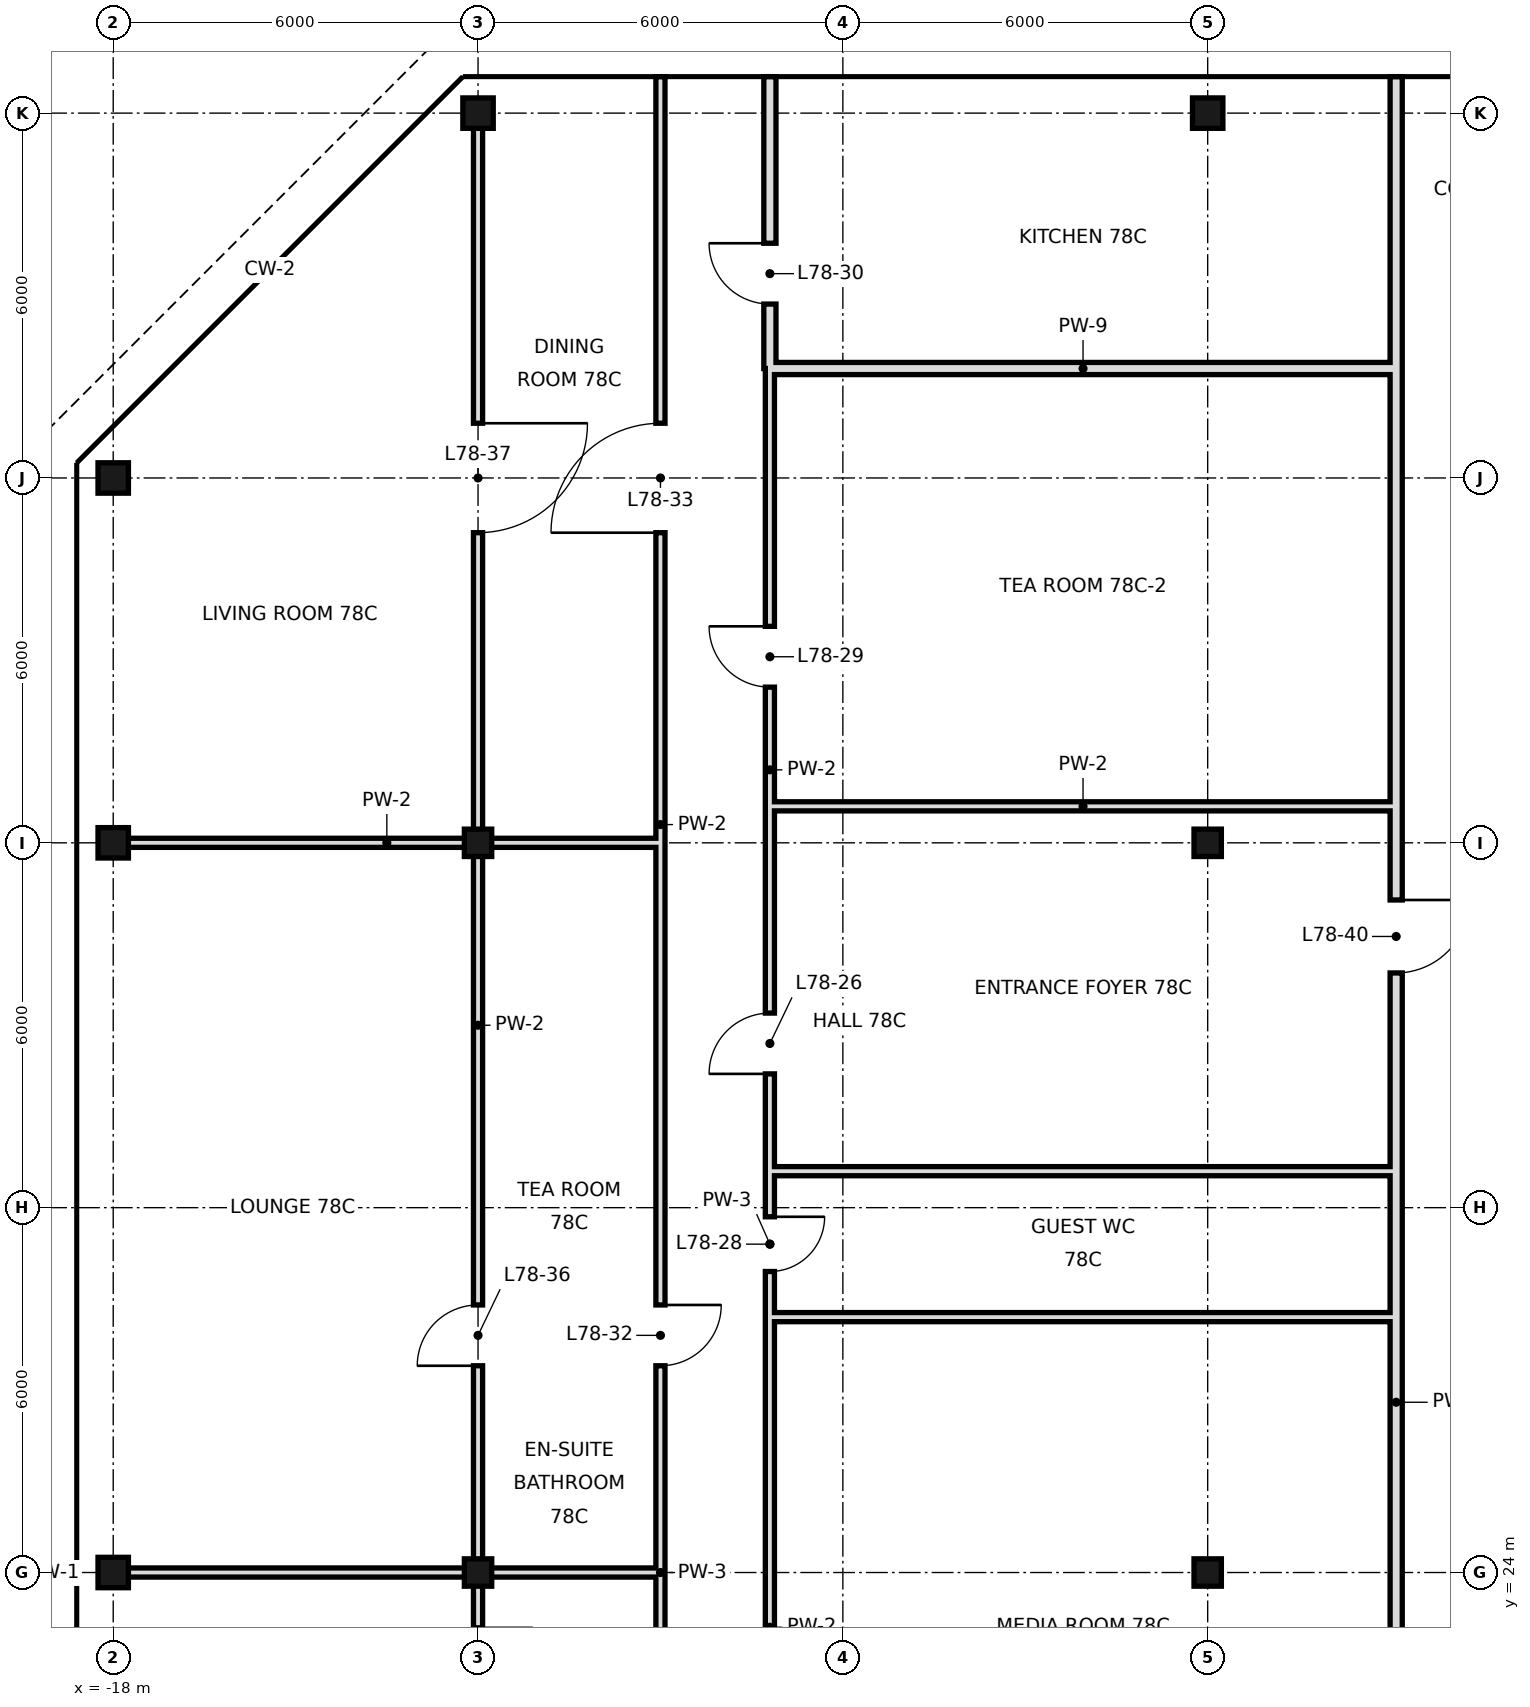
"""IFC4 building model, lengths in metres.
Left out: names, types, materials, properties, quantities, classifications, styles, units other than length and angle.
Written with IfcOpenShell. Run it as: python <this file> out.ifc"""

import sys

from ifc_helpers import new_model, si_unit, direction, frame, frame_2d, origin, origin_2d, place, context, subcontext, project, spatial, rectangle, hollow_rectangle, extrude, element, fill, save


model = new_model("IFC4")
c1 = context("Model", 3, precision=1e-05, world=origin(), true_north=direction((0.0, 1.0)))
c2 = subcontext(c1, "Body", "Model", "MODEL_VIEW")
j1 = project(units=[si_unit("LENGTHUNIT", "METRE"), si_unit("PLANEANGLEUNIT", "RADIAN")], contexts=[c1])
p1 = place(None, origin())
s1 = spatial("IfcSite", under=j1, at=p1, CompositionType="ELEMENT")
p2 = place(p1, origin())
s2 = spatial("IfcBuilding", under=s1, at=p2, CompositionType="ELEMENT")
p3 = place(p2, frame((0.0, 0.0, 326.8)))
s3 = spatial("IfcBuildingStorey", under=s2, at=p3, CompositionType="ELEMENT", Elevation=326.8)
for number, where, z_axis, x_axis in (
    (1, (-18.0, 24.0, 0.0), (0.0, 0.0, 1.0), (1.0, 0.0, 0.0)),
    (2, (-18.0, 36.0, 0.0), (0.0, 0.0, 1.0), (1.0, 0.0, 0.0)),
):
    element("IfcColumn", number, at=place(p3, frame(where, z_axis=z_axis, x_axis=x_axis)), inside=s3, PredefinedType="COLUMN", context=c2, shape_type="SweptSolid", body=[
        extrude(hollow_rectangle(XDim=0.5, YDim=0.5, WallThickness=0.025, at=origin_2d()), origin(), (0.0, 0.0, 1.0), 4.4),
    ])
p4 = place(p3, frame((-18.0, 42.0, 0.0), z_axis=(0.0, 0.0, 1.0), x_axis=(1.0, 0.0, 0.0)))
e3 = element("IfcColumn", 3, at=p4, inside=s3, PredefinedType="COLUMN", context=c2, shape_type="SweptSolid", body=[
    extrude(hollow_rectangle(XDim=0.5, YDim=0.5, WallThickness=0.025, at=origin_2d()), origin(), (0.0, 0.0, 1.0), 4.1),
])
for number, where, z_axis, x_axis in (
    (4, (-12.0, 24.0, 0.0), (0.0, 0.0, 1.0), (1.0, 0.0, 0.0)),
    (5, (-12.0, 36.0, 0.0), (0.0, 0.0, 1.0), (1.0, 0.0, 0.0)),
):
    element("IfcColumn", number, at=place(p3, frame(where, z_axis=z_axis, x_axis=x_axis)), inside=s3, PredefinedType="COLUMN", context=c2, shape_type="SweptSolid", body=[
        extrude(hollow_rectangle(XDim=0.45, YDim=0.45, WallThickness=0.022, at=origin_2d()), origin(), (0.0, 0.0, 1.0), 4.4),
    ])
p5 = place(p3, frame((-12.0, 48.0, 0.0), z_axis=(0.0, 0.0, 1.0), x_axis=(1.0, 0.0, 0.0)))
e6 = element("IfcColumn", 6, at=p5, inside=s3, PredefinedType="COLUMN", context=c2, shape_type="SweptSolid", body=[
    extrude(hollow_rectangle(XDim=0.5, YDim=0.5, WallThickness=0.025, at=origin_2d()), origin(), (0.0, 0.0, 1.0), 4.4),
])
for number, where, z_axis, x_axis in (
    (7, (0.0, 24.0, 0.0), (0.0, 0.0, 1.0), (1.0, 0.0, 0.0)),
    (8, (0.0, 36.0, 0.0), (0.0, 0.0, 1.0), (1.0, 0.0, 0.0)),
):
    element("IfcColumn", number, at=place(p3, frame(where, z_axis=z_axis, x_axis=x_axis)), inside=s3, PredefinedType="COLUMN", context=c2, shape_type="SweptSolid", body=[
        extrude(hollow_rectangle(XDim=0.45, YDim=0.45, WallThickness=0.022, at=origin_2d()), origin(), (0.0, 0.0, 1.0), 4.4),
    ])
p6 = place(p3, frame((0.0, 48.0, 0.0), z_axis=(0.0, 0.0, 1.0), x_axis=(1.0, 0.0, 0.0)))
e9 = element("IfcColumn", 9, at=p6, inside=s3, PredefinedType="COLUMN", context=c2, shape_type="SweptSolid", body=[
    extrude(hollow_rectangle(XDim=0.5, YDim=0.5, WallThickness=0.025, at=origin_2d()), origin(), (0.0, 0.0, 1.0), 4.4),
])
p7 = place(p3, frame((-12.0, 24.0, 0.0), z_axis=(0.0, 0.0, 1.0), x_axis=(0.0, 1.0, 0.0)))
e10 = element("IfcWall", 10, at=p7, inside=s3, PredefinedType="PARTITIONING", context=c2, shape_type="SweptSolid", body=[
    extrude(rectangle(XDim=24.0, YDim=0.15, at=frame_2d((12.0, 0.0))), origin(), (0.0, 0.0, 1.0), 3.4),
])
p8 = place(p7, frame((3.4, 0.0, 0.0)))
e11 = element("IfcOpeningElement", 11, at=p8, cuts=e10, PredefinedType="OPENING", context=c2, shape_type="SweptSolid", body=[
    extrude(rectangle(XDim=1.0, YDim=2.4, at=frame_2d((0.5, 1.2))), frame((0.0, 0.085, 0.0), z_axis=(0.0, -1.0, 0.0), x_axis=(1.0, 0.0, 0.0)), (0.0, 0.0, 1.0), 0.17),
])
p9 = place(p7, frame((17.1, 0.0, 0.0)))
e12 = element("IfcOpeningElement", 12, at=p9, cuts=e10, PredefinedType="OPENING", context=c2, shape_type="SweptSolid", body=[
    extrude(rectangle(XDim=1.8, YDim=2.4, at=frame_2d((0.9, 1.2))), frame((0.0, 0.085, 0.0), z_axis=(0.0, -1.0, 0.0), x_axis=(1.0, 0.0, 0.0)), (0.0, 0.0, 1.0), 0.17),
])
p10 = place(p3, frame((-12.0, 20.4, 0.0), z_axis=(0.0, 0.0, 1.0), x_axis=(0.0, 1.0, 0.0)))
e13 = element("IfcWall", 13, at=p10, inside=s3, PredefinedType="PARTITIONING", context=c2, shape_type="SweptSolid", body=[
    extrude(rectangle(XDim=3.6, YDim=0.15, at=frame_2d((1.8, 0.0))), origin(), (0.0, 0.0, 1.0), 3.4),
])
p11 = place(p10, frame((1.79, 0.0, 0.0)))
e14 = element("IfcOpeningElement", 14, at=p11, cuts=e13, PredefinedType="OPENING", context=c2, shape_type="SweptSolid", body=[
    extrude(rectangle(XDim=0.9, YDim=2.4, at=frame_2d((0.45, 1.2))), frame((0.0, 0.085, 0.0), z_axis=(0.0, -1.0, 0.0), x_axis=(1.0, 0.0, 0.0)), (0.0, 0.0, 1.0), 0.17),
])
p12 = place(p3, frame((-7.2, 43.8, 0.0), z_axis=(0.0, 0.0, 1.0), x_axis=(0.0, 1.0, 0.0)))
e15 = element("IfcWall", 15, at=p12, inside=s3, PredefinedType="SOLIDWALL", context=c2, shape_type="SweptSolid", body=[
    extrude(rectangle(XDim=4.8, YDim=0.2, at=frame_2d((2.4, 0.0))), origin(), (0.0, 0.0, 1.0), 3.4),
])
p13 = place(p12, frame((1.06, 0.0, 0.0)))
e16 = element("IfcOpeningElement", 16, at=p13, cuts=e15, PredefinedType="OPENING", context=c2, shape_type="SweptSolid", body=[
    extrude(rectangle(XDim=1.0, YDim=2.4, at=frame_2d((0.5, 1.2))), frame((0.0, 0.11, 0.0), z_axis=(0.0, -1.0, 0.0), x_axis=(1.0, 0.0, 0.0)), (0.0, 0.0, 1.0), 0.22),
])
p14 = place(p3, frame((-7.2, 18.0, 0.0), z_axis=(0.0, 0.0, 1.0), x_axis=(0.0, 1.0, 0.0)))
e17 = element("IfcWall", 17, at=p14, inside=s3, PredefinedType="PARTITIONING", context=c2, shape_type="SweptSolid", body=[
    extrude(rectangle(XDim=10.2, YDim=0.15, at=frame_2d((5.1, 0.0))), origin(), (0.0, 0.0, 1.0), 4.1),
])
p15 = place(p14, frame((2.86, 0.0, 0.0)))
e18 = element("IfcOpeningElement", 18, at=p15, cuts=e17, PredefinedType="OPENING", context=c2, shape_type="SweptSolid", body=[
    extrude(rectangle(XDim=1.0, YDim=2.4, at=frame_2d((0.5, 1.2))), frame((0.0, 0.085, 0.0), z_axis=(0.0, -1.0, 0.0), x_axis=(1.0, 0.0, 0.0)), (0.0, 0.0, 1.0), 0.17),
])
p16 = place(p3, frame((-7.2, 30.6, 0.0), z_axis=(0.0, 0.0, 1.0), x_axis=(0.0, 1.0, 0.0)))
e19 = element("IfcWall", 19, at=p16, inside=s3, PredefinedType="PARTITIONING", context=c2, shape_type="SweptSolid", body=[
    extrude(rectangle(XDim=13.2, YDim=0.15, at=frame_2d((6.6, 0.0))), origin(), (0.0, 0.0, 1.0), 4.1),
])
p17 = place(p16, frame((1.6, 0.0, 0.0)))
e20 = element("IfcOpeningElement", 20, at=p17, cuts=e19, PredefinedType="OPENING", context=c2, shape_type="SweptSolid", body=[
    extrude(rectangle(XDim=1.0, YDim=2.4, at=frame_2d((0.5, 1.2))), frame((0.0, 0.085, 0.0), z_axis=(0.0, -1.0, 0.0), x_axis=(1.0, 0.0, 0.0)), (0.0, 0.0, 1.0), 0.17),
])
p18 = place(p16, frame((7.96, 0.0, 0.0)))
e21 = element("IfcOpeningElement", 21, at=p18, cuts=e19, PredefinedType="OPENING", context=c2, shape_type="SweptSolid", body=[
    extrude(rectangle(XDim=1.0, YDim=2.4, at=frame_2d((0.5, 1.2))), frame((0.0, 0.085, 0.0), z_axis=(0.0, -1.0, 0.0), x_axis=(1.0, 0.0, 0.0)), (0.0, 0.0, 1.0), 0.17),
])
p19 = place(p3, frame((-7.2, 28.2, 0.0), z_axis=(0.0, 0.0, 1.0), x_axis=(0.0, 1.0, 0.0)))
e22 = element("IfcWall", 22, at=p19, inside=s3, PredefinedType="PARTITIONING", context=c2, shape_type="SweptSolid", body=[
    extrude(rectangle(XDim=2.4, YDim=0.15, at=frame_2d((1.2, 0.0))), origin(), (0.0, 0.0, 1.0), 4.1),
])
p20 = place(p19, frame((0.75, 0.0, 0.0)))
e23 = element("IfcOpeningElement", 23, at=p20, cuts=e22, PredefinedType="OPENING", context=c2, shape_type="SweptSolid", body=[
    extrude(rectangle(XDim=0.9, YDim=2.4, at=frame_2d((0.45, 1.2))), frame((0.0, 0.085, 0.0), z_axis=(0.0, -1.0, 0.0), x_axis=(1.0, 0.0, 0.0)), (0.0, 0.0, 1.0), 0.17),
])
p21 = place(p3, frame((-9.0, 24.0, 0.0), z_axis=(0.0, 0.0, 1.0), x_axis=(0.0, 1.0, 0.0)))
e24 = element("IfcWall", 24, at=p21, inside=s3, PredefinedType="PARTITIONING", context=c2, shape_type="SweptSolid", body=[
    extrude(rectangle(XDim=24.6, YDim=0.15, at=frame_2d((12.3, 0.0))), origin(), (0.0, 0.0, 1.0), 4.1),
])
p22 = place(p21, frame((3.4, 0.0, 0.0)))
e25 = element("IfcOpeningElement", 25, at=p22, cuts=e24, PredefinedType="OPENING", context=c2, shape_type="SweptSolid", body=[
    extrude(rectangle(XDim=1.0, YDim=2.4, at=frame_2d((0.5, 1.2))), frame((0.0, 0.085, 0.0), z_axis=(0.0, -1.0, 0.0), x_axis=(1.0, 0.0, 0.0)), (0.0, 0.0, 1.0), 0.17),
])
p23 = place(p21, frame((17.1, 0.0, 0.0)))
e26 = element("IfcOpeningElement", 26, at=p23, cuts=e24, PredefinedType="OPENING", context=c2, shape_type="SweptSolid", body=[
    extrude(rectangle(XDim=1.8, YDim=2.4, at=frame_2d((0.9, 1.2))), frame((0.0, 0.085, 0.0), z_axis=(0.0, -1.0, 0.0), x_axis=(1.0, 0.0, 0.0)), (0.0, 0.0, 1.0), 0.17),
])
p24 = place(p3, frame((-9.0, 20.4, 0.0), z_axis=(0.0, 0.0, 1.0), x_axis=(0.0, 1.0, 0.0)))
e27 = element("IfcWall", 27, at=p24, inside=s3, PredefinedType="PARTITIONING", context=c2, shape_type="SweptSolid", body=[
    extrude(rectangle(XDim=3.6, YDim=0.15, at=frame_2d((1.8, 0.0))), origin(), (0.0, 0.0, 1.0), 4.1),
])
p25 = place(p3, frame((3.1, 18.7, 0.0), z_axis=(0.0, 0.0, 1.0), x_axis=(0.0, 1.0, 0.0)))
e28 = element("IfcWall", 28, at=p25, inside=s3, PredefinedType="SOLIDWALL", context=c2, shape_type="SweptSolid", body=[
    extrude(rectangle(XDim=25.1, YDim=0.2, at=frame_2d((12.55, 0.0))), origin(), (0.0, 0.0, 1.0), 3.65),
])
p26 = place(p25, frame((15.16, 0.0, 0.0)))
e29 = element("IfcOpeningElement", 29, at=p26, cuts=e28, PredefinedType="OPENING", context=c2, shape_type="SweptSolid", body=[
    extrude(rectangle(XDim=1.2, YDim=2.4, at=frame_2d((0.6, 1.2))), frame((0.0, 0.11, 0.0), z_axis=(0.0, -1.0, 0.0), x_axis=(1.0, 0.0, 0.0)), (0.0, 0.0, 1.0), 0.22),
])
p27 = place(p3, frame((3.1, 43.8, 0.0), z_axis=(0.0, 0.0, 1.0), x_axis=(0.0, 1.0, 0.0)))
e30 = element("IfcWall", 30, at=p27, inside=s3, PredefinedType="SOLIDWALL", context=c2, shape_type="SweptSolid", body=[
    extrude(rectangle(XDim=4.8, YDim=0.2, at=frame_2d((2.4, 0.0))), origin(), (0.0, 0.0, 1.0), 3.4),
])
p28 = place(p3, frame((-18.0, 24.0, 0.0), z_axis=(0.0, 0.0, 1.0), x_axis=(1.0, 0.0, 0.0)))
e31 = element("IfcWall", 31, at=p28, inside=s3, PredefinedType="PARTITIONING", context=c2, shape_type="SweptSolid", body=[
    extrude(rectangle(XDim=6.0, YDim=0.15, at=frame_2d((3.0, 0.0))), origin(), (0.0, 0.0, 1.0), 3.65),
])
p29 = place(p3, frame((-12.0, 24.0, 0.0), z_axis=(0.0, 0.0, 1.0), x_axis=(1.0, 0.0, 0.0)))
e32 = element("IfcWall", 32, at=p29, inside=s3, PredefinedType="PARTITIONING", context=c2, shape_type="SweptSolid", body=[
    extrude(rectangle(XDim=3.0, YDim=0.15, at=frame_2d((1.5, 0.0))), origin(), (0.0, 0.0, 1.0), 3.4),
])
for number, where, z_axis, x_axis in (
    (33, (-7.2, 28.2, 0.0), (0.0, 0.0, 1.0), (1.0, 0.0, 0.0)),
    (34, (-7.2, 30.6, 0.0), (0.0, 0.0, 1.0), (1.0, 0.0, 0.0)),
):
    element("IfcWall", number, at=place(p3, frame(where, z_axis=z_axis, x_axis=x_axis)), inside=s3, PredefinedType="PARTITIONING", context=c2, shape_type="SweptSolid", body=[
        extrude(rectangle(XDim=10.3, YDim=0.15, at=frame_2d((5.15, 0.0))), origin(), (0.0, 0.0, 1.0), 4.1),
    ])
p30 = place(p3, frame((-18.0, 36.0, 0.0), z_axis=(0.0, 0.0, 1.0), x_axis=(1.0, 0.0, 0.0)))
e35 = element("IfcWall", 35, at=p30, inside=s3, PredefinedType="PARTITIONING", context=c2, shape_type="SweptSolid", body=[
    extrude(rectangle(XDim=9.0, YDim=0.15, at=frame_2d((4.5, 0.0))), origin(), (0.0, 0.0, 1.0), 3.4),
])
p31 = place(p3, frame((-7.2, 36.6, 0.0), z_axis=(0.0, 0.0, 1.0), x_axis=(1.0, 0.0, 0.0)))
e36 = element("IfcWall", 36, at=p31, inside=s3, PredefinedType="PARTITIONING", context=c2, shape_type="SweptSolid", body=[
    extrude(rectangle(XDim=10.3, YDim=0.15, at=frame_2d((5.15, 0.0))), origin(), (0.0, 0.0, 1.0), 4.1),
])
p32 = place(p3, frame((-7.2, 43.8, 0.0), z_axis=(0.0, 0.0, 1.0), x_axis=(1.0, 0.0, 0.0)))
e37 = element("IfcWall", 37, at=p32, inside=s3, PredefinedType="SOLIDWALL", context=c2, shape_type="SweptSolid", body=[
    extrude(rectangle(XDim=10.3, YDim=0.2, at=frame_2d((5.15, 0.0))), origin(), (0.0, 0.0, 1.0), 3.4),
])
p33 = place(p17, origin())
e38 = element("IfcDoor", 38, at=p33, inside=s3, OperationType="SINGLE_SWING_LEFT", PredefinedType="DOOR", context=c2, shape_type="SweptSolid", body=[
    extrude(rectangle(XDim=1.0, YDim=2.4, at=frame_2d((0.5, 1.2))), frame((0.0, 0.025, 0.0), z_axis=(0.0, -1.0, 0.0), x_axis=(1.0, 0.0, 0.0)), (0.0, 0.0, 1.0), 0.05),
])
fill(e20, e38)
p34 = place(p20, origin())
e39 = element("IfcDoor", 39, at=p34, inside=s3, OperationType="SINGLE_SWING_RIGHT", PredefinedType="DOOR", context=c2, shape_type="SweptSolid", body=[
    extrude(rectangle(XDim=0.9, YDim=2.4, at=frame_2d((0.45, 1.2))), frame((0.0, 0.025, 0.0), z_axis=(0.0, -1.0, 0.0), x_axis=(1.0, 0.0, 0.0)), (0.0, 0.0, 1.0), 0.05),
])
fill(e23, e39)
p35 = place(p18, frame((1.0, 0.0, 0.0), z_axis=(0.0, 0.0, 1.0), x_axis=(-1.0, 0.0, 0.0)))
e40 = element("IfcDoor", 40, at=p35, inside=s3, OperationType="SINGLE_SWING_LEFT", PredefinedType="DOOR", context=c2, shape_type="SweptSolid", body=[
    extrude(rectangle(XDim=1.0, YDim=2.4, at=frame_2d((0.5, 1.2))), frame((0.0, 0.025, 0.0), z_axis=(0.0, -1.0, 0.0), x_axis=(1.0, 0.0, 0.0)), (0.0, 0.0, 1.0), 0.05),
])
fill(e21, e40)
p36 = place(p13, frame((1.0, 0.0, 0.0), z_axis=(0.0, 0.0, 1.0), x_axis=(-1.0, 0.0, 0.0)))
e41 = element("IfcDoor", 41, at=p36, inside=s3, OperationType="SINGLE_SWING_LEFT", PredefinedType="DOOR", context=c2, shape_type="SweptSolid", body=[
    extrude(rectangle(XDim=1.0, YDim=2.4, at=frame_2d((0.5, 1.2))), frame((0.0, 0.025, 0.0), z_axis=(0.0, -1.0, 0.0), x_axis=(1.0, 0.0, 0.0)), (0.0, 0.0, 1.0), 0.05),
])
fill(e16, e41)
p37 = place(p22, origin())
e42 = element("IfcDoor", 42, at=p37, inside=s3, OperationType="SINGLE_SWING_RIGHT", PredefinedType="DOOR", context=c2, shape_type="SweptSolid", body=[
    extrude(rectangle(XDim=1.0, YDim=2.4, at=frame_2d((0.5, 1.2))), frame((0.0, 0.025, 0.0), z_axis=(0.0, -1.0, 0.0), x_axis=(1.0, 0.0, 0.0)), (0.0, 0.0, 1.0), 0.05),
])
fill(e25, e42)
p38 = place(p23, origin())
e43 = element("IfcDoor", 43, at=p38, inside=s3, OperationType="SINGLE_SWING_LEFT", PredefinedType="DOOR", context=c2, shape_type="SweptSolid", body=[
    extrude(rectangle(XDim=1.8, YDim=2.4, at=frame_2d((0.9, 1.2))), frame((0.0, 0.025, 0.0), z_axis=(0.0, -1.0, 0.0), x_axis=(1.0, 0.0, 0.0)), (0.0, 0.0, 1.0), 0.05),
])
fill(e26, e43)
p39 = place(p8, origin())
e44 = element("IfcDoor", 44, at=p39, inside=s3, OperationType="SINGLE_SWING_LEFT", PredefinedType="DOOR", context=c2, shape_type="SweptSolid", body=[
    extrude(rectangle(XDim=1.0, YDim=2.4, at=frame_2d((0.5, 1.2))), frame((0.0, 0.025, 0.0), z_axis=(0.0, -1.0, 0.0), x_axis=(1.0, 0.0, 0.0)), (0.0, 0.0, 1.0), 0.05),
])
fill(e11, e44)
p40 = place(p9, origin())
e45 = element("IfcDoor", 45, at=p40, inside=s3, OperationType="SINGLE_SWING_RIGHT", PredefinedType="DOOR", context=c2, shape_type="SweptSolid", body=[
    extrude(rectangle(XDim=1.8, YDim=2.4, at=frame_2d((0.9, 1.2))), frame((0.0, 0.025, 0.0), z_axis=(0.0, -1.0, 0.0), x_axis=(1.0, 0.0, 0.0)), (0.0, 0.0, 1.0), 0.05),
])
fill(e12, e45)
p41 = place(p26, origin())
e46 = element("IfcDoor", 46, at=p41, inside=s3, OperationType="SINGLE_SWING_RIGHT", PredefinedType="DOOR", context=c2, shape_type="SweptSolid", body=[
    extrude(rectangle(XDim=1.2, YDim=2.4, at=frame_2d((0.6, 1.2))), frame((0.0, 0.025, 0.0), z_axis=(0.0, -1.0, 0.0), x_axis=(1.0, 0.0, 0.0)), (0.0, 0.0, 1.0), 0.05),
])
fill(e29, e46)
save(model, sys.argv[1])
